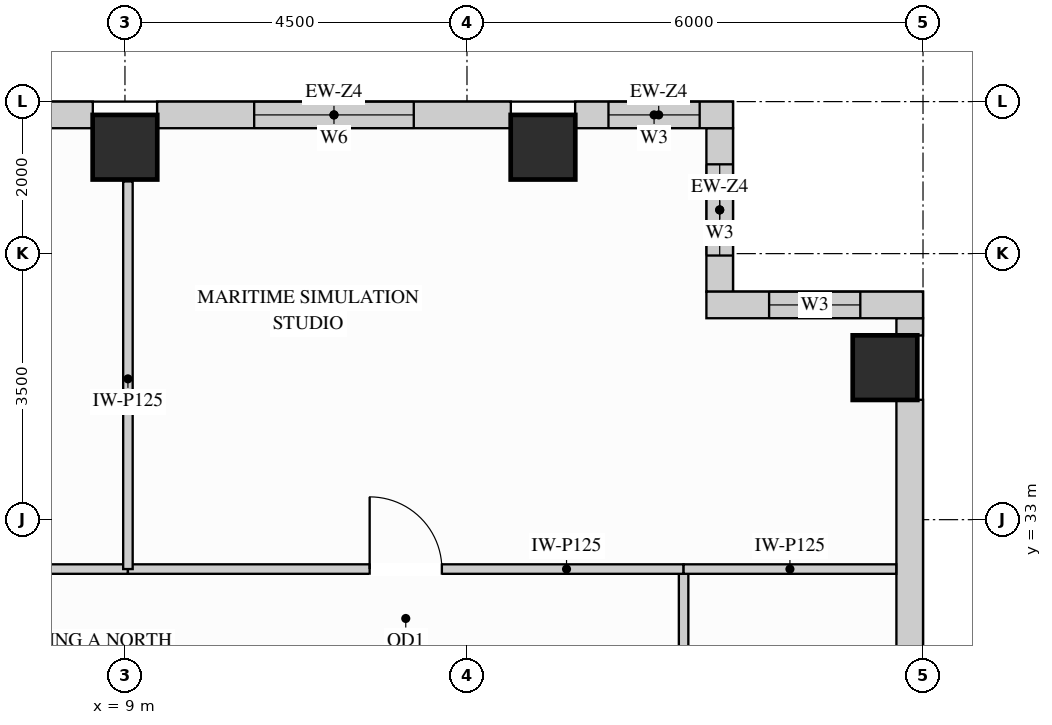
"""IFC4 building model, lengths in metres.
Left out: names, types, materials, properties, quantities, classifications, styles, units other than length and angle.
Written with IfcOpenShell. Run it as: python <this file> out.ifc"""

import sys

from ifc_helpers import new_model, si_unit, direction, frame, frame_2d, origin, origin_2d, place, context, subcontext, project, spatial, rectangle, extrude, source, transform, mapped, element, fill, save


model = new_model("IFC4")
c1 = context("Model", 3, precision=1e-05, world=origin(), true_north=direction((0.0, 1.0)))
c2 = subcontext(c1, "Body", "Model", "MODEL_VIEW")
j1 = project(units=[si_unit("LENGTHUNIT", "METRE"), si_unit("PLANEANGLEUNIT", "RADIAN")], contexts=[c1])
p1 = place(None, origin())
s1 = spatial("IfcSite", under=j1, at=p1, CompositionType="ELEMENT")
p2 = place(p1, origin())
s2 = spatial("IfcBuilding", under=s1, at=p2, CompositionType="ELEMENT")
p3 = place(p2, frame((0.0, 0.0, 273.6)))
s3 = spatial("IfcBuildingStorey", under=s2, at=p3, CompositionType="ELEMENT", Elevation=273.6)
m1 = source(origin(), c2, "Body", "SweptSolid", [
    extrude(rectangle(XDim=0.85, YDim=0.85, at=origin_2d()), origin(), (0.0, 0.0, 1.0), 3.37),
])
for number, where, z_axis, x_axis in (
    (1, (19.0, 35.0, 0.0), (0.0, 0.0, 1.0), (1.0, 0.0, 0.0)),
    (2, (14.5, 37.9, 0.0), (0.0, 0.0, 1.0), (1.0, 0.0, 0.0)),
    (3, (9.0, 37.9, 0.0), (0.0, 0.0, 1.0), (1.0, 0.0, 0.0)),
):
    element("IfcColumn", number, at=place(p3, frame(where, z_axis=z_axis, x_axis=x_axis)), inside=s3, PredefinedType="COLUMN", context=c2, shape_type="MappedRepresentation", body=[
        mapped(m1, transform((0.0, 0.0, 0.0), x_axis=(1.0, 0.0, 0.0), y_axis=(0.0, 1.0, 0.0), z_axis=(0.0, 0.0, 1.0))),
    ])
p4 = place(p3, frame((16.825, 35.998, 0.0), z_axis=(0.0, 0.0, 1.0), x_axis=(0.0, 1.0, 0.0)))
e4 = element("IfcWall", 4, at=p4, inside=s3, PredefinedType="SOLIDWALL", context=c2, shape_type="SweptSolid", body=[
    extrude(rectangle(XDim=2.154, YDim=0.35, at=frame_2d((1.077, 0.0))), origin(), (0.0, 0.0, 1.0), 3.355),
])
p5 = place(p4, frame((0.477, 0.0, 0.78)))
e5 = element("IfcOpeningElement", 5, at=p5, cuts=e4, PredefinedType="OPENING", context=c2, shape_type="SweptSolid", body=[
    extrude(rectangle(XDim=1.2, YDim=2.25, at=frame_2d((0.6, 1.125))), frame((0.0, 0.185, 0.0), z_axis=(0.0, -1.0, 0.0), x_axis=(1.0, 0.0, 0.0)), (0.0, 0.0, 1.0), 0.37),
])
p6 = place(p3, frame((17.0, 38.325, 0.0), z_axis=(0.0, 0.0, 1.0), x_axis=(-1.0, 0.0, 0.0)))
e6 = element("IfcWall", 6, at=p6, inside=s3, PredefinedType="SOLIDWALL", context=c2, shape_type="SweptSolid", body=[
    extrude(rectangle(XDim=2.077, YDim=0.35, at=frame_2d((1.039, 0.0))), origin(), (0.0, 0.0, 1.0), 3.355),
])
p7 = place(p6, frame((0.438, 0.0, 0.78)))
e7 = element("IfcOpeningElement", 7, at=p7, cuts=e6, PredefinedType="OPENING", context=c2, shape_type="SweptSolid", body=[
    extrude(rectangle(XDim=1.2, YDim=2.25, at=frame_2d((0.6, 1.125))), frame((0.0, 0.185, 0.0), z_axis=(0.0, -1.0, 0.0), x_axis=(1.0, 0.0, 0.0)), (0.0, 0.0, 1.0), 0.37),
])
p8 = place(p3, frame((14.077, 38.325, 0.0), z_axis=(0.0, 0.0, 1.0), x_axis=(-1.0, 0.0, 0.0)))
e8 = element("IfcWall", 8, at=p8, inside=s3, PredefinedType="SOLIDWALL", context=c2, shape_type="SweptSolid", body=[
    extrude(rectangle(XDim=4.654, YDim=0.35, at=frame_2d((2.327, 0.0))), origin(), (0.0, 0.0, 1.0), 3.355),
])
p9 = place(p8, frame((1.277, 0.0, 0.78)))
e9 = element("IfcOpeningElement", 9, at=p9, cuts=e8, PredefinedType="OPENING", context=c2, shape_type="SweptSolid", body=[
    extrude(rectangle(XDim=2.1, YDim=2.25, at=frame_2d((1.05, 1.125))), frame((0.0, 0.185, 0.0), z_axis=(0.0, -1.0, 0.0), x_axis=(1.0, 0.0, 0.0)), (0.0, 0.0, 1.0), 0.37),
])
p10 = place(p3, frame((8.577, 38.325, 0.0), z_axis=(0.0, 0.0, 1.0), x_axis=(-1.0, 0.0, 0.0)))
e10 = element("IfcWall", 10, at=p10, inside=s3, PredefinedType="SOLIDWALL", context=c2, shape_type="SweptSolid", body=[
    extrude(rectangle(XDim=4.654, YDim=0.35, at=frame_2d((2.327, 0.0))), origin(), (0.0, 0.0, 1.0), 3.355),
])
p11 = place(p10, frame((1.277, 0.0, 0.78)))
e11 = element("IfcOpeningElement", 11, at=p11, cuts=e10, PredefinedType="OPENING", context=c2, shape_type="SweptSolid", body=[
    extrude(rectangle(XDim=2.1, YDim=2.25, at=frame_2d((1.05, 1.125))), frame((0.0, 0.185, 0.0), z_axis=(0.0, -1.0, 0.0), x_axis=(1.0, 0.0, 0.0)), (0.0, 0.0, 1.0), 0.37),
])
m2 = source(origin(), c2, "Body", "SweptSolid", [
    extrude(rectangle(XDim=3.654, YDim=0.35, at=frame_2d((1.827, 0.0))), origin(), (0.0, 0.0, 1.0), 2.589),
])
p12 = place(p3, frame((19.325, 30.923, 0.0), z_axis=(0.0, 0.0, 1.0), x_axis=(0.0, 1.0, 0.0)))
e12 = element("IfcWall", 12, at=p12, inside=s3, PredefinedType="SOLIDWALL", context=c2, shape_type="MappedRepresentation", body=[
    mapped(m2, transform((0.0, 0.0, 0.0), x_axis=(1.0, 0.0, 0.0), y_axis=(0.0, 1.0, 0.0), z_axis=(0.0, 0.0, 1.0))),
])
m3 = source(origin(), c2, "Body", "SweptSolid", [
    extrude(rectangle(XDim=0.229, YDim=0.35, at=frame_2d((0.115, 0.0))), origin(), (0.0, 0.0, 1.0), 3.355),
])
p13 = place(p3, frame((19.325, 35.423, 0.0), z_axis=(0.0, 0.0, 1.0), x_axis=(0.0, 1.0, 0.0)))
e13 = element("IfcWall", 13, at=p13, inside=s3, PredefinedType="SOLIDWALL", context=c2, shape_type="MappedRepresentation", body=[
    mapped(m3, transform((0.0, 0.0, 0.0), x_axis=(1.0, 0.0, 0.0), y_axis=(0.0, 1.0, 0.0), z_axis=(0.0, 0.0, 1.0))),
])
p14 = place(p3, frame((19.5, 35.825, 0.0), z_axis=(0.0, 0.0, 1.0), x_axis=(-1.0, 0.0, 0.0)))
e14 = element("IfcWall", 14, at=p14, inside=s3, PredefinedType="SOLIDWALL", context=c2, shape_type="SweptSolid", body=[
    extrude(rectangle(XDim=2.85, YDim=0.35, at=frame_2d((1.425, 0.0))), origin(), (0.0, 0.0, 1.0), 3.355),
])
p15 = place(p14, frame((0.825, 0.0, 0.78)))
e15 = element("IfcOpeningElement", 15, at=p15, cuts=e14, PredefinedType="OPENING", context=c2, shape_type="SweptSolid", body=[
    extrude(rectangle(XDim=1.2, YDim=2.25, at=frame_2d((0.6, 1.125))), frame((0.0, 0.185, 0.0), z_axis=(0.0, -1.0, 0.0), x_axis=(1.0, 0.0, 0.0)), (0.0, 0.0, 1.0), 0.37),
])
p16 = place(p3, frame((16.35, 26.05, 0.0), z_axis=(0.0, 0.0, 1.0), x_axis=(0.0, 1.0, 0.0)))
e16 = element("IfcWall", 16, at=p16, inside=s3, PredefinedType="PARTITIONING", context=c2, shape_type="SweptSolid", body=[
    extrude(rectangle(XDim=6.3, YDim=0.125, at=frame_2d((3.15, 0.0))), origin(), (0.0, 0.0, 1.0), 3.355),
])
p17 = place(p16, frame((2.675, 0.0, 0.0)))
e17 = element("IfcOpeningElement", 17, at=p17, cuts=e16, PredefinedType="OPENING", context=c2, shape_type="SweptSolid", body=[
    extrude(rectangle(XDim=0.95, YDim=2.15, at=frame_2d((0.475, 1.075))), frame((0.0, 0.073, 0.0), z_axis=(0.0, -1.0, 0.0), x_axis=(1.0, 0.0, 0.0)), (0.0, 0.0, 1.0), 0.145),
])
p18 = place(p3, frame((2.45, 32.35, 0.0), z_axis=(0.0, 0.0, 1.0), x_axis=(1.0, 0.0, 0.0)))
e18 = element("IfcWall", 18, at=p18, inside=s3, PredefinedType="PARTITIONING", context=c2, shape_type="SweptSolid", body=[
    extrude(rectangle(XDim=6.589, YDim=0.125, at=frame_2d((3.294, 0.0))), origin(), (0.0, 0.0, 1.0), 3.355),
])
p19 = place(p18, frame((2.82, 0.0, 0.0)))
e19 = element("IfcOpeningElement", 19, at=p19, cuts=e18, PredefinedType="OPENING", context=c2, shape_type="SweptSolid", body=[
    extrude(rectangle(XDim=0.95, YDim=2.15, at=frame_2d((0.475, 1.075))), frame((0.0, 0.073, 0.0), z_axis=(0.0, -1.0, 0.0), x_axis=(1.0, 0.0, 0.0)), (0.0, 0.0, 1.0), 0.145),
])
p20 = place(p3, frame((9.039, 32.35, 0.0), z_axis=(0.0, 0.0, 1.0), x_axis=(1.0, 0.0, 0.0)))
e20 = element("IfcWall", 20, at=p20, inside=s3, PredefinedType="PARTITIONING", context=c2, shape_type="SweptSolid", body=[
    extrude(rectangle(XDim=7.311, YDim=0.125, at=frame_2d((3.656, 0.0))), origin(), (0.0, 0.0, 1.0), 3.355),
])
p21 = place(p20, frame((3.18, 0.0, 0.0)))
e21 = element("IfcOpeningElement", 21, at=p21, cuts=e20, PredefinedType="OPENING", context=c2, shape_type="SweptSolid", body=[
    extrude(rectangle(XDim=0.95, YDim=2.15, at=frame_2d((0.475, 1.075))), frame((0.0, 0.073, 0.0), z_axis=(0.0, -1.0, 0.0), x_axis=(1.0, 0.0, 0.0)), (0.0, 0.0, 1.0), 0.145),
])
m4 = source(origin(), c2, "Body", "SweptSolid", [
    extrude(rectangle(XDim=2.798, YDim=0.125, at=frame_2d((1.399, 0.0))), origin(), (0.0, 0.0, 1.0), 3.355),
])
p22 = place(p3, frame((16.35, 32.35, 0.0), z_axis=(0.0, 0.0, 1.0), x_axis=(1.0, 0.0, 0.0)))
e22 = element("IfcWall", 22, at=p22, inside=s3, PredefinedType="PARTITIONING", context=c2, shape_type="MappedRepresentation", body=[
    mapped(m4, transform((0.0, 0.0, 0.0), x_axis=(1.0, 0.0, 0.0), y_axis=(0.0, 1.0, 0.0), z_axis=(0.0, 0.0, 1.0))),
])
m5 = source(origin(), c2, "Body", "SweptSolid", [
    extrude(rectangle(XDim=5.1, YDim=0.125, at=frame_2d((2.55, 0.0))), origin(), (0.0, 0.0, 1.0), 3.355),
])
p23 = place(p3, frame((9.039, 32.35, 0.0), z_axis=(0.0, 0.0, 1.0), x_axis=(0.0, 1.0, 0.0)))
e23 = element("IfcWall", 23, at=p23, inside=s3, PredefinedType="PARTITIONING", context=c2, shape_type="MappedRepresentation", body=[
    mapped(m5, transform((0.0, 0.0, 0.0), x_axis=(1.0, 0.0, 0.0), y_axis=(0.0, 1.0, 0.0), z_axis=(0.0, 0.0, 1.0))),
])
m6 = source(origin(), c2, "Body", "SweptSolid", [
    extrude(rectangle(XDim=0.95, YDim=2.15, at=frame_2d((0.475, 1.075))), frame((0.0, 0.025, 0.0), z_axis=(0.0, -1.0, 0.0), x_axis=(1.0, 0.0, 0.0)), (0.0, 0.0, 1.0), 0.05),
])
p24 = place(p21, origin())
e24 = element("IfcDoor", 24, at=p24, inside=s3, OperationType="SINGLE_SWING_LEFT", PredefinedType="DOOR", context=c2, shape_type="MappedRepresentation", body=[
    mapped(m6, transform((0.0, 0.0, 0.0), x_axis=(1.0, 0.0, 0.0), y_axis=(0.0, 1.0, 0.0), z_axis=(0.0, 0.0, 1.0))),
])
fill(e21, e24)
m7 = source(origin(), c2, "Body", "SweptSolid", [
    extrude(rectangle(XDim=1.2, YDim=2.25, at=frame_2d((0.6, 1.125))), frame((0.0, 0.03, 0.0), z_axis=(0.0, -1.0, 0.0), x_axis=(1.0, 0.0, 0.0)), (0.0, 0.0, 1.0), 0.06),
])
p25 = place(p5, origin())
e25 = element("IfcWindow", 25, at=p25, inside=s3, PartitioningType="SINGLE_PANEL", PredefinedType="WINDOW", context=c2, shape_type="MappedRepresentation", body=[
    mapped(m7, transform((0.0, 0.0, 0.0), x_axis=(1.0, 0.0, 0.0), y_axis=(0.0, 1.0, 0.0), z_axis=(0.0, 0.0, 1.0))),
])
fill(e5, e25)
p26 = place(p7, origin())
e26 = element("IfcWindow", 26, at=p26, inside=s3, PartitioningType="SINGLE_PANEL", PredefinedType="WINDOW", context=c2, shape_type="MappedRepresentation", body=[
    mapped(m7, transform((0.0, 0.0, 0.0), x_axis=(1.0, 0.0, 0.0), y_axis=(0.0, 1.0, 0.0), z_axis=(0.0, 0.0, 1.0))),
])
fill(e7, e26)
p27 = place(p15, origin())
e27 = element("IfcWindow", 27, at=p27, inside=s3, PartitioningType="SINGLE_PANEL", PredefinedType="WINDOW", context=c2, shape_type="MappedRepresentation", body=[
    mapped(m7, transform((0.0, 0.0, 0.0), x_axis=(1.0, 0.0, 0.0), y_axis=(0.0, 1.0, 0.0), z_axis=(0.0, 0.0, 1.0))),
])
fill(e15, e27)
m8 = source(origin(), c2, "Body", "SweptSolid", [
    extrude(rectangle(XDim=2.1, YDim=2.25, at=frame_2d((1.05, 1.125))), frame((0.0, 0.03, 0.0), z_axis=(0.0, -1.0, 0.0), x_axis=(1.0, 0.0, 0.0)), (0.0, 0.0, 1.0), 0.06),
])
p28 = place(p9, origin())
e28 = element("IfcWindow", 28, at=p28, inside=s3, PartitioningType="SINGLE_PANEL", PredefinedType="WINDOW", context=c2, shape_type="MappedRepresentation", body=[
    mapped(m8, transform((0.0, 0.0, 0.0), x_axis=(1.0, 0.0, 0.0), y_axis=(0.0, 1.0, 0.0), z_axis=(0.0, 0.0, 1.0))),
])
fill(e9, e28)
save(model, sys.argv[1])
